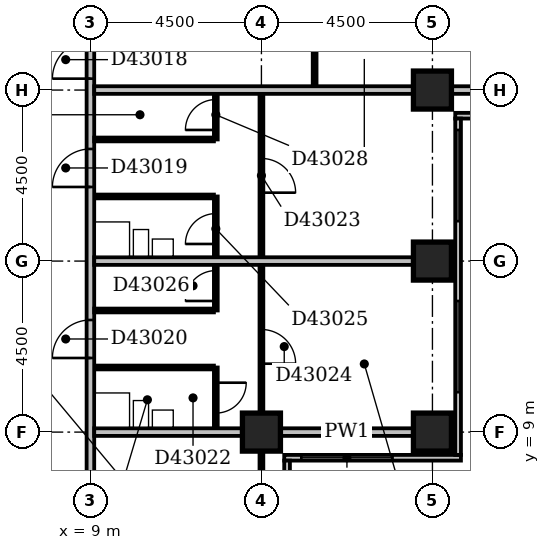
"""IFC4 building model, lengths in metres.
Left out: names, types, materials, properties, quantities, classifications, styles, units other than length and angle.
Written with IfcOpenShell. Run it as: python <this file> out.ifc"""

import sys

from ifc_helpers import new_model, si_unit, direction, frame, frame_2d, origin, origin_2d, place, context, subcontext, project, spatial, rectangle, extrude, element, fill, save


model = new_model("IFC4")
c1 = context("Model", 3, precision=1e-05, world=origin(), true_north=direction((0.0, 1.0)))
c2 = subcontext(c1, "Body", "Model", "MODEL_VIEW")
j1 = project(units=[si_unit("LENGTHUNIT", "METRE"), si_unit("PLANEANGLEUNIT", "RADIAN")], contexts=[c1])
p1 = place(None, origin())
s1 = spatial("IfcSite", under=j1, at=p1, CompositionType="ELEMENT")
p2 = place(p1, origin())
s2 = spatial("IfcBuilding", under=s1, at=p2, CompositionType="ELEMENT")
p3 = place(p2, frame((0.0, 0.0, 170.0)))
s3 = spatial("IfcBuildingStorey", under=s2, at=p3, CompositionType="ELEMENT", Elevation=170.0)
for number, where, z_axis, x_axis in (
    (1, (13.5, 9.0, -0.3), (0.0, 0.0, 1.0), (1.0, 0.0, 0.0)),
    (2, (18.0, 9.0, -0.3), (0.0, 0.0, 1.0), (1.0, 0.0, 0.0)),
    (3, (18.0, 13.5, -0.3), (0.0, 0.0, 1.0), (1.0, 0.0, 0.0)),
    (4, (18.0, 18.0, -0.3), (0.0, 0.0, 1.0), (1.0, 0.0, 0.0)),
):
    element("IfcColumn", number, at=place(p3, frame(where, z_axis=z_axis, x_axis=x_axis)), inside=s3, PredefinedType="COLUMN", context=c2, shape_type="SweptSolid", body=[
        extrude(rectangle(XDim=1.0, YDim=1.0, at=origin_2d()), origin(), (0.0, 0.0, 1.0), 3.45),
    ])
p4 = place(p3, frame((14.175, 3.9, 0.0), z_axis=(0.0, 0.0, 1.0), x_axis=(0.0, 1.0, 0.0)))
e5 = element("IfcWall", 5, at=p4, inside=s3, PredefinedType="STANDARD", context=c2, shape_type="SweptSolid", body=[
    extrude(rectangle(XDim=4.35, YDim=0.15, at=frame_2d((2.175, 0.0))), origin(), (0.0, 0.0, 1.0), 2.5),
])
p5 = place(p4, frame((1.65, 0.0, 0.6)))
e6 = element("IfcOpeningElement", 6, at=p5, cuts=e5, PredefinedType="OPENING", context=c2, shape_type="SweptSolid", body=[
    extrude(rectangle(XDim=2.4, YDim=1.8, at=frame_2d((1.2, 0.9))), frame((0.0, 0.087, 0.0), z_axis=(0.0, -1.0, 0.0), x_axis=(1.0, 0.0, 0.0)), (0.0, 0.0, 1.0), 0.174),
])
p6 = place(p3, frame((14.1, 8.325, 0.0), z_axis=(0.0, 0.0, 1.0), x_axis=(1.0, 0.0, 0.0)))
e7 = element("IfcWall", 7, at=p6, inside=s3, PredefinedType="STANDARD", context=c2, shape_type="SweptSolid", body=[
    extrude(rectangle(XDim=4.65, YDim=0.15, at=frame_2d((2.325, 0.0))), origin(), (0.0, 0.0, 1.0), 2.5),
])
p7 = place(p6, frame((0.45, 0.0, 0.6)))
e8 = element("IfcOpeningElement", 8, at=p7, cuts=e7, PredefinedType="OPENING", context=c2, shape_type="SweptSolid", body=[
    extrude(rectangle(XDim=2.4, YDim=1.8, at=frame_2d((1.2, 0.9))), frame((0.0, 0.087, 0.0), z_axis=(0.0, -1.0, 0.0), x_axis=(1.0, 0.0, 0.0)), (0.0, 0.0, 1.0), 0.174),
])
p8 = place(p3, frame((18.675, 8.4, 0.0), z_axis=(0.0, 0.0, 1.0), x_axis=(0.0, 1.0, 0.0)))
e9 = element("IfcWall", 9, at=p8, inside=s3, PredefinedType="STANDARD", context=c2, shape_type="SweptSolid", body=[
    extrude(rectangle(XDim=8.85, YDim=0.15, at=frame_2d((4.425, 0.0))), origin(), (0.0, 0.0, 1.0), 2.5),
])
p9 = place(p8, frame((1.65, 0.0, 0.6)))
e10 = element("IfcOpeningElement", 10, at=p9, cuts=e9, PredefinedType="OPENING", context=c2, shape_type="SweptSolid", body=[
    extrude(rectangle(XDim=2.4, YDim=1.8, at=frame_2d((1.2, 0.9))), frame((0.0, 0.087, 0.0), z_axis=(0.0, -1.0, 0.0), x_axis=(1.0, 0.0, 0.0)), (0.0, 0.0, 1.0), 0.174),
])
p10 = place(p8, frame((6.15, 0.0, 0.6)))
e11 = element("IfcOpeningElement", 11, at=p10, cuts=e9, PredefinedType="OPENING", context=c2, shape_type="SweptSolid", body=[
    extrude(rectangle(XDim=2.4, YDim=1.8, at=frame_2d((1.2, 0.9))), frame((0.0, 0.087, 0.0), z_axis=(0.0, -1.0, 0.0), x_axis=(1.0, 0.0, 0.0)), (0.0, 0.0, 1.0), 0.174),
])
p11 = place(p3, frame((18.6, 17.325, 0.0), z_axis=(0.0, 0.0, 1.0), x_axis=(1.0, 0.0, 0.0)))
e12 = element("IfcWall", 12, at=p11, inside=s3, PredefinedType="STANDARD", context=c2, shape_type="SweptSolid", body=[
    extrude(rectangle(XDim=4.65, YDim=0.15, at=frame_2d((2.325, 0.0))), origin(), (0.0, 0.0, 1.0), 2.5),
])
p12 = place(p11, frame((0.45, 0.0, 0.6)))
e13 = element("IfcOpeningElement", 13, at=p12, cuts=e12, PredefinedType="OPENING", context=c2, shape_type="SweptSolid", body=[
    extrude(rectangle(XDim=2.4, YDim=1.8, at=frame_2d((1.2, 0.9))), frame((0.0, 0.087, 0.0), z_axis=(0.0, -1.0, 0.0), x_axis=(1.0, 0.0, 0.0)), (0.0, 0.0, 1.0), 0.174),
])
p13 = place(p3, frame((9.0, 5.0, 0.0), z_axis=(0.0, 0.0, 1.0), x_axis=(0.0, 1.0, 0.0)))
e14 = element("IfcWall", 14, at=p13, inside=s3, PredefinedType="PARTITIONING", context=c2, shape_type="SweptSolid", body=[
    extrude(rectangle(XDim=27.75, YDim=0.2, at=frame_2d((13.875, 0.0))), origin(), (0.0, 0.0, 1.0), 3.15),
])
p14 = place(p13, frame((13.3, 0.0, 0.0)))
e15 = element("IfcOpeningElement", 15, at=p14, cuts=e14, PredefinedType="OPENING", context=c2, shape_type="SweptSolid", body=[
    extrude(rectangle(XDim=1.0, YDim=2.1, at=frame_2d((0.5, 1.05))), frame((0.0, 0.112, 0.0), z_axis=(0.0, -1.0, 0.0), x_axis=(1.0, 0.0, 0.0)), (0.0, 0.0, 1.0), 0.224),
])
p15 = place(p13, frame((10.45, 0.0, 0.0)))
e16 = element("IfcOpeningElement", 16, at=p15, cuts=e14, PredefinedType="OPENING", context=c2, shape_type="SweptSolid", body=[
    extrude(rectangle(XDim=1.0, YDim=2.1, at=frame_2d((0.5, 1.05))), frame((0.0, 0.112, 0.0), z_axis=(0.0, -1.0, 0.0), x_axis=(1.0, 0.0, 0.0)), (0.0, 0.0, 1.0), 0.224),
])
p16 = place(p13, frame((5.95, 0.0, 0.0)))
e17 = element("IfcOpeningElement", 17, at=p16, cuts=e14, PredefinedType="OPENING", context=c2, shape_type="SweptSolid", body=[
    extrude(rectangle(XDim=1.0, YDim=2.1, at=frame_2d((0.5, 1.05))), frame((0.0, 0.112, 0.0), z_axis=(0.0, -1.0, 0.0), x_axis=(1.0, 0.0, 0.0)), (0.0, 0.0, 1.0), 0.224),
])
p17 = place(p13, frame((1.5, 0.0, 0.0)))
e18 = element("IfcOpeningElement", 18, at=p17, cuts=e14, PredefinedType="OPENING", context=c2, shape_type="SweptSolid", body=[
    extrude(rectangle(XDim=0.9, YDim=2.1, at=frame_2d((0.45, 1.05))), frame((0.0, 0.112, 0.0), z_axis=(0.0, -1.0, 0.0), x_axis=(1.0, 0.0, 0.0)), (0.0, 0.0, 1.0), 0.224),
])
p18 = place(p3, frame((13.5, 5.0, 0.0), z_axis=(0.0, 0.0, 1.0), x_axis=(0.0, 1.0, 0.0)))
e19 = element("IfcWall", 19, at=p18, inside=s3, PredefinedType="PARTITIONING", context=c2, shape_type="SweptSolid", body=[
    extrude(rectangle(XDim=3.5, YDim=0.1, at=frame_2d((1.75, 0.0))), origin(), (0.0, 0.0, 1.0), 2.5),
])
p19 = place(p3, frame((9.1, 9.0, 0.0), z_axis=(0.0, 0.0, 1.0), x_axis=(1.0, 0.0, 0.0)))
e20 = element("IfcWall", 20, at=p19, inside=s3, PredefinedType="PARTITIONING", context=c2, shape_type="SweptSolid", body=[
    extrude(rectangle(XDim=3.9, YDim=0.2, at=frame_2d((1.95, 0.0))), origin(), (0.0, 0.0, 1.0), 3.15),
])
p20 = place(p3, frame((14.0, 9.0, 0.0), z_axis=(0.0, 0.0, 1.0), x_axis=(1.0, 0.0, 0.0)))
e21 = element("IfcWall", 21, at=p20, inside=s3, PredefinedType="PARTITIONING", context=c2, shape_type="SweptSolid", body=[
    extrude(rectangle(XDim=3.5, YDim=0.2, at=frame_2d((1.75, 0.0))), origin(), (0.0, 0.0, 1.0), 2.5),
])
p21 = place(p3, frame((12.3, 9.1, 0.0), z_axis=(0.0, 0.0, 1.0), x_axis=(0.0, 1.0, 0.0)))
e22 = element("IfcWall", 22, at=p21, inside=s3, PredefinedType="PARTITIONING", context=c2, shape_type="SweptSolid", body=[
    extrude(rectangle(XDim=1.6, YDim=0.1, at=frame_2d((0.8, 0.0))), origin(), (0.0, 0.0, 1.0), 3.15),
])
p22 = place(p21, frame((0.4, 0.0, 0.0)))
e23 = element("IfcOpeningElement", 23, at=p22, cuts=e22, PredefinedType="OPENING", context=c2, shape_type="SweptSolid", body=[
    extrude(rectangle(XDim=0.8, YDim=2.1, at=frame_2d((0.4, 1.05))), frame((0.0, 0.062, 0.0), z_axis=(0.0, -1.0, 0.0), x_axis=(1.0, 0.0, 0.0)), (0.0, 0.0, 1.0), 0.124),
])
p23 = place(p3, frame((13.5, 9.5, 0.0), z_axis=(0.0, 0.0, 1.0), x_axis=(0.0, 1.0, 0.0)))
e24 = element("IfcWall", 24, at=p23, inside=s3, PredefinedType="PARTITIONING", context=c2, shape_type="SweptSolid", body=[
    extrude(rectangle(XDim=8.4, YDim=0.1, at=frame_2d((4.2, 0.0))), origin(), (0.0, 0.0, 1.0), 3.15),
])
p24 = place(p23, frame((5.8, 0.0, 0.0)))
e25 = element("IfcOpeningElement", 25, at=p24, cuts=e24, PredefinedType="OPENING", context=c2, shape_type="SweptSolid", body=[
    extrude(rectangle(XDim=0.9, YDim=2.1, at=frame_2d((0.45, 1.05))), frame((0.0, 0.062, 0.0), z_axis=(0.0, -1.0, 0.0), x_axis=(1.0, 0.0, 0.0)), (0.0, 0.0, 1.0), 0.124),
])
p25 = place(p23, frame((1.3, 0.0, 0.0)))
e26 = element("IfcOpeningElement", 26, at=p25, cuts=e24, PredefinedType="OPENING", context=c2, shape_type="SweptSolid", body=[
    extrude(rectangle(XDim=0.9, YDim=2.1, at=frame_2d((0.45, 1.05))), frame((0.0, 0.062, 0.0), z_axis=(0.0, -1.0, 0.0), x_axis=(1.0, 0.0, 0.0)), (0.0, 0.0, 1.0), 0.124),
])
p26 = place(p3, frame((9.1, 10.7, 0.0), z_axis=(0.0, 0.0, 1.0), x_axis=(1.0, 0.0, 0.0)))
e27 = element("IfcWall", 27, at=p26, inside=s3, PredefinedType="PLUMBINGWALL", context=c2, shape_type="SweptSolid", body=[
    extrude(rectangle(XDim=3.15, YDim=0.1, at=frame_2d((1.575, 0.0))), origin(), (0.0, 0.0, 1.0), 3.15),
])
p27 = place(p3, frame((9.1, 12.2, 0.0), z_axis=(0.0, 0.0, 1.0), x_axis=(1.0, 0.0, 0.0)))
e28 = element("IfcWall", 28, at=p27, inside=s3, PredefinedType="PARTITIONING", context=c2, shape_type="SweptSolid", body=[
    extrude(rectangle(XDim=3.15, YDim=0.1, at=frame_2d((1.575, 0.0))), origin(), (0.0, 0.0, 1.0), 3.15),
])
p28 = place(p3, frame((12.3, 12.2, 0.0), z_axis=(0.0, 0.0, 1.0), x_axis=(0.0, 1.0, 0.0)))
e29 = element("IfcWall", 29, at=p28, inside=s3, PredefinedType="PARTITIONING", context=c2, shape_type="SweptSolid", body=[
    extrude(rectangle(XDim=3.0, YDim=0.1, at=frame_2d((1.5, 0.0))), origin(), (0.0, 0.0, 1.0), 3.15),
])
p29 = place(p28, frame((1.75, 0.0, 0.0)))
e30 = element("IfcOpeningElement", 30, at=p29, cuts=e29, PredefinedType="OPENING", context=c2, shape_type="SweptSolid", body=[
    extrude(rectangle(XDim=0.8, YDim=2.1, at=frame_2d((0.4, 1.05))), frame((0.0, 0.062, 0.0), z_axis=(0.0, -1.0, 0.0), x_axis=(1.0, 0.0, 0.0)), (0.0, 0.0, 1.0), 0.124),
])
p30 = place(p28, frame((0.25, 0.0, 0.0)))
e31 = element("IfcOpeningElement", 31, at=p30, cuts=e29, PredefinedType="OPENING", context=c2, shape_type="SweptSolid", body=[
    extrude(rectangle(XDim=0.8, YDim=2.1, at=frame_2d((0.4, 1.05))), frame((0.0, 0.062, 0.0), z_axis=(0.0, -1.0, 0.0), x_axis=(1.0, 0.0, 0.0)), (0.0, 0.0, 1.0), 0.124),
])
p31 = place(p3, frame((9.1, 13.5, 0.0), z_axis=(0.0, 0.0, 1.0), x_axis=(1.0, 0.0, 0.0)))
e32 = element("IfcWall", 32, at=p31, inside=s3, PredefinedType="PARTITIONING", context=c2, shape_type="SweptSolid", body=[
    extrude(rectangle(XDim=8.4, YDim=0.2, at=frame_2d((4.2, 0.0))), origin(), (0.0, 0.0, 1.0), 3.15),
])
p32 = place(p3, frame((9.1, 15.2, 0.0), z_axis=(0.0, 0.0, 1.0), x_axis=(1.0, 0.0, 0.0)))
e33 = element("IfcWall", 33, at=p32, inside=s3, PredefinedType="PLUMBINGWALL", context=c2, shape_type="SweptSolid", body=[
    extrude(rectangle(XDim=3.15, YDim=0.1, at=frame_2d((1.575, 0.0))), origin(), (0.0, 0.0, 1.0), 3.15),
])
p33 = place(p3, frame((9.1, 16.7, 0.0), z_axis=(0.0, 0.0, 1.0), x_axis=(1.0, 0.0, 0.0)))
e34 = element("IfcWall", 34, at=p33, inside=s3, PredefinedType="PARTITIONING", context=c2, shape_type="SweptSolid", body=[
    extrude(rectangle(XDim=3.15, YDim=0.1, at=frame_2d((1.575, 0.0))), origin(), (0.0, 0.0, 1.0), 3.15),
])
p34 = place(p3, frame((12.3, 16.7, 0.0), z_axis=(0.0, 0.0, 1.0), x_axis=(0.0, 1.0, 0.0)))
e35 = element("IfcWall", 35, at=p34, inside=s3, PredefinedType="PARTITIONING", context=c2, shape_type="SweptSolid", body=[
    extrude(rectangle(XDim=1.2, YDim=0.1, at=frame_2d((0.6, 0.0))), origin(), (0.0, 0.0, 1.0), 3.15),
])
p35 = place(p34, frame((0.25, 0.0, 0.0)))
e36 = element("IfcOpeningElement", 36, at=p35, cuts=e35, PredefinedType="OPENING", context=c2, shape_type="SweptSolid", body=[
    extrude(rectangle(XDim=0.8, YDim=2.1, at=frame_2d((0.4, 1.05))), frame((0.0, 0.062, 0.0), z_axis=(0.0, -1.0, 0.0), x_axis=(1.0, 0.0, 0.0)), (0.0, 0.0, 1.0), 0.124),
])
p36 = place(p3, frame((9.1, 18.0, 0.0), z_axis=(0.0, 0.0, 1.0), x_axis=(1.0, 0.0, 0.0)))
e37 = element("IfcWall", 37, at=p36, inside=s3, PredefinedType="PARTITIONING", context=c2, shape_type="SweptSolid", body=[
    extrude(rectangle(XDim=8.4, YDim=0.2, at=frame_2d((4.2, 0.0))), origin(), (0.0, 0.0, 1.0), 2.45),
])
p37 = place(p3, frame((18.5, 18.0, 0.0), z_axis=(0.0, 0.0, 1.0), x_axis=(1.0, 0.0, 0.0)))
e38 = element("IfcWall", 38, at=p37, inside=s3, PredefinedType="PARTITIONING", context=c2, shape_type="SweptSolid", body=[
    extrude(rectangle(XDim=3.5, YDim=0.2, at=frame_2d((1.75, 0.0))), origin(), (0.0, 0.0, 1.0), 2.5),
])
p38 = place(p3, frame((14.9, 18.1, 0.0), z_axis=(0.0, 0.0, 1.0), x_axis=(0.0, 1.0, 0.0)))
e39 = element("IfcWall", 39, at=p38, inside=s3, PredefinedType="PARTITIONING", context=c2, shape_type="SweptSolid", body=[
    extrude(rectangle(XDim=13.3, YDim=0.1, at=frame_2d((6.65, 0.0))), origin(), (0.0, 0.0, 1.0), 3.15),
])
p39 = place(p38, frame((1.7, 0.0, 0.0)))
e40 = element("IfcOpeningElement", 40, at=p39, cuts=e39, PredefinedType="OPENING", context=c2, shape_type="SweptSolid", body=[
    extrude(rectangle(XDim=0.9, YDim=2.1, at=frame_2d((0.45, 1.05))), frame((0.0, 0.062, 0.0), z_axis=(0.0, -1.0, 0.0), x_axis=(1.0, 0.0, 0.0)), (0.0, 0.0, 1.0), 0.124),
])
p40 = place(p38, frame((6.2, 0.0, 0.0)))
e41 = element("IfcOpeningElement", 41, at=p40, cuts=e39, PredefinedType="OPENING", context=c2, shape_type="SweptSolid", body=[
    extrude(rectangle(XDim=0.9, YDim=2.1, at=frame_2d((0.45, 1.05))), frame((0.0, 0.062, 0.0), z_axis=(0.0, -1.0, 0.0), x_axis=(1.0, 0.0, 0.0)), (0.0, 0.0, 1.0), 0.124),
])
p41 = place(p38, frame((10.7, 0.0, 0.0)))
e42 = element("IfcOpeningElement", 42, at=p41, cuts=e39, PredefinedType="OPENING", context=c2, shape_type="SweptSolid", body=[
    extrude(rectangle(XDim=0.9, YDim=2.1, at=frame_2d((0.45, 1.05))), frame((0.0, 0.062, 0.0), z_axis=(0.0, -1.0, 0.0), x_axis=(1.0, 0.0, 0.0)), (0.0, 0.0, 1.0), 0.124),
])
p42 = place(p7, origin())
e43 = element("IfcWindow", 43, at=p42, inside=s3, PartitioningType="SINGLE_PANEL", PredefinedType="WINDOW", context=c2, shape_type="SweptSolid", body=[
    extrude(rectangle(XDim=2.4, YDim=1.8, at=frame_2d((1.2, 0.9))), frame((0.0, 0.03, 0.0), z_axis=(0.0, -1.0, 0.0), x_axis=(1.0, 0.0, 0.0)), (0.0, 0.0, 1.0), 0.06),
])
fill(e8, e43)
p43 = place(p9, origin())
e44 = element("IfcWindow", 44, at=p43, inside=s3, PartitioningType="SINGLE_PANEL", PredefinedType="WINDOW", context=c2, shape_type="SweptSolid", body=[
    extrude(rectangle(XDim=2.4, YDim=1.8, at=frame_2d((1.2, 0.9))), frame((0.0, 0.03, 0.0), z_axis=(0.0, -1.0, 0.0), x_axis=(1.0, 0.0, 0.0)), (0.0, 0.0, 1.0), 0.06),
])
fill(e10, e44)
p44 = place(p10, origin())
e45 = element("IfcWindow", 45, at=p44, inside=s3, PartitioningType="SINGLE_PANEL", PredefinedType="WINDOW", context=c2, shape_type="SweptSolid", body=[
    extrude(rectangle(XDim=2.4, YDim=1.8, at=frame_2d((1.2, 0.9))), frame((0.0, 0.03, 0.0), z_axis=(0.0, -1.0, 0.0), x_axis=(1.0, 0.0, 0.0)), (0.0, 0.0, 1.0), 0.06),
])
fill(e11, e45)
p45 = place(p14, origin())
e46 = element("IfcDoor", 46, at=p45, inside=s3, OperationType="SINGLE_SWING_LEFT", PredefinedType="DOOR", context=c2, shape_type="SweptSolid", body=[
    extrude(rectangle(XDim=1.0, YDim=2.1, at=frame_2d((0.5, 1.05))), frame((0.0, 0.025, 0.0), z_axis=(0.0, -1.0, 0.0), x_axis=(1.0, 0.0, 0.0)), (0.0, 0.0, 1.0), 0.05),
])
fill(e15, e46)
p46 = place(p15, origin())
e47 = element("IfcDoor", 47, at=p46, inside=s3, OperationType="SINGLE_SWING_LEFT", PredefinedType="DOOR", context=c2, shape_type="SweptSolid", body=[
    extrude(rectangle(XDim=1.0, YDim=2.1, at=frame_2d((0.5, 1.05))), frame((0.0, 0.025, 0.0), z_axis=(0.0, -1.0, 0.0), x_axis=(1.0, 0.0, 0.0)), (0.0, 0.0, 1.0), 0.05),
])
fill(e16, e47)
p47 = place(p16, origin())
e48 = element("IfcDoor", 48, at=p47, inside=s3, OperationType="SINGLE_SWING_LEFT", PredefinedType="DOOR", context=c2, shape_type="SweptSolid", body=[
    extrude(rectangle(XDim=1.0, YDim=2.1, at=frame_2d((0.5, 1.05))), frame((0.0, 0.025, 0.0), z_axis=(0.0, -1.0, 0.0), x_axis=(1.0, 0.0, 0.0)), (0.0, 0.0, 1.0), 0.05),
])
fill(e17, e48)
p48 = place(p22, origin())
e49 = element("IfcDoor", 49, at=p48, inside=s3, OperationType="SINGLE_SWING_RIGHT", PredefinedType="DOOR", context=c2, shape_type="SweptSolid", body=[
    extrude(rectangle(XDim=0.8, YDim=2.1, at=frame_2d((0.4, 1.05))), frame((0.0, 0.025, 0.0), z_axis=(0.0, -1.0, 0.0), x_axis=(1.0, 0.0, 0.0)), (0.0, 0.0, 1.0), 0.05),
])
fill(e23, e49)
p49 = place(p24, frame((0.9, 0.0, 0.0), z_axis=(0.0, 0.0, 1.0), x_axis=(-1.0, 0.0, 0.0)))
e50 = element("IfcDoor", 50, at=p49, inside=s3, OperationType="SINGLE_SWING_RIGHT", PredefinedType="DOOR", context=c2, shape_type="SweptSolid", body=[
    extrude(rectangle(XDim=0.9, YDim=2.1, at=frame_2d((0.45, 1.05))), frame((0.0, 0.025, 0.0), z_axis=(0.0, -1.0, 0.0), x_axis=(1.0, 0.0, 0.0)), (0.0, 0.0, 1.0), 0.05),
])
fill(e25, e50)
p50 = place(p25, frame((0.9, 0.0, 0.0), z_axis=(0.0, 0.0, 1.0), x_axis=(-1.0, 0.0, 0.0)))
e51 = element("IfcDoor", 51, at=p50, inside=s3, OperationType="SINGLE_SWING_RIGHT", PredefinedType="DOOR", context=c2, shape_type="SweptSolid", body=[
    extrude(rectangle(XDim=0.9, YDim=2.1, at=frame_2d((0.45, 1.05))), frame((0.0, 0.025, 0.0), z_axis=(0.0, -1.0, 0.0), x_axis=(1.0, 0.0, 0.0)), (0.0, 0.0, 1.0), 0.05),
])
fill(e26, e51)
p51 = place(p29, origin())
e52 = element("IfcDoor", 52, at=p51, inside=s3, OperationType="SINGLE_SWING_LEFT", PredefinedType="DOOR", context=c2, shape_type="SweptSolid", body=[
    extrude(rectangle(XDim=0.8, YDim=2.1, at=frame_2d((0.4, 1.05))), frame((0.0, 0.025, 0.0), z_axis=(0.0, -1.0, 0.0), x_axis=(1.0, 0.0, 0.0)), (0.0, 0.0, 1.0), 0.05),
])
fill(e30, e52)
p52 = place(p30, origin())
e53 = element("IfcDoor", 53, at=p52, inside=s3, OperationType="SINGLE_SWING_LEFT", PredefinedType="DOOR", context=c2, shape_type="SweptSolid", body=[
    extrude(rectangle(XDim=0.8, YDim=2.1, at=frame_2d((0.4, 1.05))), frame((0.0, 0.025, 0.0), z_axis=(0.0, -1.0, 0.0), x_axis=(1.0, 0.0, 0.0)), (0.0, 0.0, 1.0), 0.05),
])
fill(e31, e53)
p53 = place(p35, origin())
e54 = element("IfcDoor", 54, at=p53, inside=s3, OperationType="SINGLE_SWING_LEFT", PredefinedType="DOOR", context=c2, shape_type="SweptSolid", body=[
    extrude(rectangle(XDim=0.8, YDim=2.1, at=frame_2d((0.4, 1.05))), frame((0.0, 0.025, 0.0), z_axis=(0.0, -1.0, 0.0), x_axis=(1.0, 0.0, 0.0)), (0.0, 0.0, 1.0), 0.05),
])
fill(e36, e54)
save(model, sys.argv[1])
